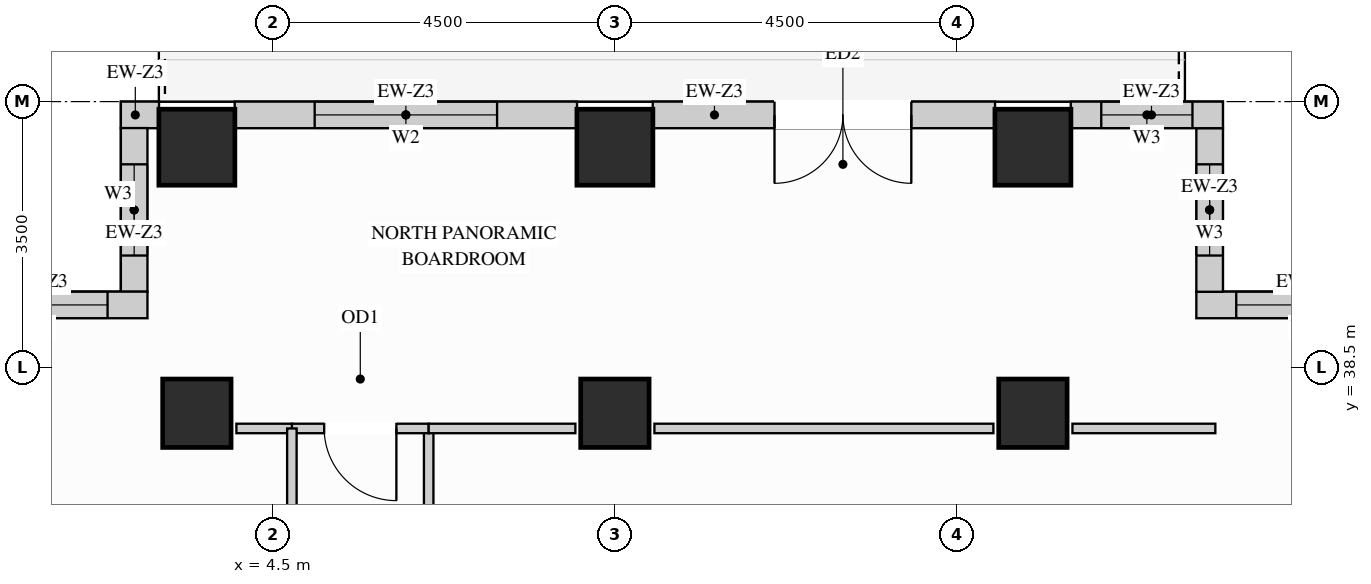
"""IFC4 building model, lengths in metres.
Left out: names, types, materials, properties, quantities, classifications, styles, units other than length and angle.
Written with IfcOpenShell. Run it as: python <this file> out.ifc"""

import sys

from ifc_helpers import new_model, si_unit, direction, frame, frame_2d, origin, origin_2d, place, context, subcontext, project, spatial, rectangle, extrude, source, transform, mapped, element, fill, save


model = new_model("IFC4")
c1 = context("Model", 3, precision=1e-05, world=origin(), true_north=direction((0.0, 1.0)))
c2 = subcontext(c1, "Body", "Model", "MODEL_VIEW")
j1 = project(units=[si_unit("LENGTHUNIT", "METRE"), si_unit("PLANEANGLEUNIT", "RADIAN")], contexts=[c1])
p1 = place(None, origin())
s1 = spatial("IfcSite", under=j1, at=p1, CompositionType="ELEMENT")
p2 = place(p1, origin())
s2 = spatial("IfcBuilding", under=s1, at=p2, CompositionType="ELEMENT")
p3 = place(p2, frame((0.0, 0.0, 143.1)))
s3 = spatial("IfcBuildingStorey", under=s2, at=p3, CompositionType="ELEMENT", Elevation=143.1)
m1 = source(origin(), c2, "Body", "SweptSolid", [
    extrude(rectangle(XDim=0.9, YDim=0.9, at=origin_2d()), origin(), (0.0, 0.0, 1.0), 3.4),
])
for number, where, z_axis, x_axis in (
    (1, (14.5, 37.9, 0.0), (0.0, 0.0, 1.0), (1.0, 0.0, 0.0)),
    (2, (3.5, 37.9, 0.0), (0.0, 0.0, 1.0), (1.0, 0.0, 0.0)),
    (3, (9.0, 37.9, 0.0), (0.0, 0.0, 1.0), (1.0, 0.0, 0.0)),
):
    element("IfcColumn", number, at=place(p3, frame(where, z_axis=z_axis, x_axis=x_axis)), inside=s3, PredefinedType="COLUMN", context=c2, shape_type="MappedRepresentation", body=[
        mapped(m1, transform((0.0, 0.0, 0.0), x_axis=(1.0, 0.0, 0.0), y_axis=(0.0, 1.0, 0.0), z_axis=(0.0, 0.0, 1.0))),
    ])
m2 = source(origin(), c2, "Body", "SweptSolid", [
    extrude(rectangle(XDim=1.0, YDim=1.0, at=origin_2d()), origin(), (0.0, 0.0, 1.0), 3.4),
])
for number, where, z_axis, x_axis in (
    (4, (14.5, 41.4, 0.0), (0.0, 0.0, 1.0), (1.0, 0.0, 0.0)),
    (5, (3.5, 41.4, 0.0), (0.0, 0.0, 1.0), (1.0, 0.0, 0.0)),
    (6, (9.0, 41.4, 0.0), (0.0, 0.0, 1.0), (1.0, 0.0, 0.0)),
):
    element("IfcColumn", number, at=place(p3, frame(where, z_axis=z_axis, x_axis=x_axis)), inside=s3, PredefinedType="COLUMN", context=c2, shape_type="MappedRepresentation", body=[
        mapped(m2, transform((0.0, 0.0, 0.0), x_axis=(1.0, 0.0, 0.0), y_axis=(0.0, 1.0, 0.0), z_axis=(0.0, 0.0, 1.0))),
    ])
p4 = place(p3, frame((19.5, 39.325, 0.0), z_axis=(0.0, 0.0, 1.0), x_axis=(-1.0, 0.0, 0.0)))
e7 = element("IfcWall", 7, at=p4, inside=s3, PredefinedType="SOLIDWALL", context=c2, shape_type="SweptSolid", body=[
    extrude(rectangle(XDim=2.85, YDim=0.35, at=frame_2d((1.425, 0.0))), origin(), (0.0, 0.0, 1.0), 3.385),
])
p5 = place(p4, frame((0.525, 0.0, 0.78)))
e8 = element("IfcOpeningElement", 8, at=p5, cuts=e7, PredefinedType="OPENING", context=c2, shape_type="SweptSolid", body=[
    extrude(rectangle(XDim=1.8, YDim=2.1, at=frame_2d((0.9, 1.05))), frame((0.0, 0.185, 0.0), z_axis=(0.0, -1.0, 0.0), x_axis=(1.0, 0.0, 0.0)), (0.0, 0.0, 1.0), 0.37),
])
p6 = place(p3, frame((16.825, 39.498, 0.0), z_axis=(0.0, 0.0, 1.0), x_axis=(0.0, 1.0, 0.0)))
e9 = element("IfcWall", 9, at=p6, inside=s3, PredefinedType="SOLIDWALL", context=c2, shape_type="SweptSolid", body=[
    extrude(rectangle(XDim=2.154, YDim=0.35, at=frame_2d((1.077, 0.0))), origin(), (0.0, 0.0, 1.0), 3.385),
])
p7 = place(p6, frame((0.477, 0.0, 0.78)))
e10 = element("IfcOpeningElement", 10, at=p7, cuts=e9, PredefinedType="OPENING", context=c2, shape_type="SweptSolid", body=[
    extrude(rectangle(XDim=1.2, YDim=2.1, at=frame_2d((0.6, 1.05))), frame((0.0, 0.185, 0.0), z_axis=(0.0, -1.0, 0.0), x_axis=(1.0, 0.0, 0.0)), (0.0, 0.0, 1.0), 0.37),
])
p8 = place(p3, frame((17.0, 41.825, 0.0), z_axis=(0.0, 0.0, 1.0), x_axis=(-1.0, 0.0, 0.0)))
e11 = element("IfcWall", 11, at=p8, inside=s3, PredefinedType="SOLIDWALL", context=c2, shape_type="SweptSolid", body=[
    extrude(rectangle(XDim=2.002, YDim=0.35, at=frame_2d((1.001, 0.0))), origin(), (0.0, 0.0, 1.0), 3.385),
])
p9 = place(p8, frame((0.401, 0.0, 0.78)))
e12 = element("IfcOpeningElement", 12, at=p9, cuts=e11, PredefinedType="OPENING", context=c2, shape_type="SweptSolid", body=[
    extrude(rectangle(XDim=1.2, YDim=2.1, at=frame_2d((0.6, 1.05))), frame((0.0, 0.185, 0.0), z_axis=(0.0, -1.0, 0.0), x_axis=(1.0, 0.0, 0.0)), (0.0, 0.0, 1.0), 0.37),
])
p10 = place(p3, frame((14.002, 41.825, 0.0), z_axis=(0.0, 0.0, 1.0), x_axis=(-1.0, 0.0, 0.0)))
e13 = element("IfcWall", 13, at=p10, inside=s3, PredefinedType="SOLIDWALL", context=c2, shape_type="SweptSolid", body=[
    extrude(rectangle(XDim=4.504, YDim=0.35, at=frame_2d((2.252, 0.0))), origin(), (0.0, 0.0, 1.0), 2.612),
])
p11 = place(p10, frame((1.102, 0.0, 0.0)))
e14 = element("IfcOpeningElement", 14, at=p11, cuts=e13, PredefinedType="OPENING", context=c2, shape_type="SweptSolid", body=[
    extrude(rectangle(XDim=1.8, YDim=2.2, at=frame_2d((0.9, 1.1))), frame((0.0, 0.185, 0.0), z_axis=(0.0, -1.0, 0.0), x_axis=(1.0, 0.0, 0.0)), (0.0, 0.0, 1.0), 0.37),
])
p12 = place(p3, frame((8.502, 41.825, 0.0), z_axis=(0.0, 0.0, 1.0), x_axis=(-1.0, 0.0, 0.0)))
e15 = element("IfcWall", 15, at=p12, inside=s3, PredefinedType="SOLIDWALL", context=c2, shape_type="SweptSolid", body=[
    extrude(rectangle(XDim=4.504, YDim=0.35, at=frame_2d((2.252, 0.0))), origin(), (0.0, 0.0, 1.0), 2.612),
])
p13 = place(p12, frame((1.052, 0.0, 0.78)))
e16 = element("IfcOpeningElement", 16, at=p13, cuts=e15, PredefinedType="OPENING", context=c2, shape_type="SweptSolid", body=[
    extrude(rectangle(XDim=2.4, YDim=1.652, at=frame_2d((1.2, 0.826))), frame((0.0, 0.185, 0.0), z_axis=(0.0, -1.0, 0.0), x_axis=(1.0, 0.0, 0.0)), (0.0, 0.0, 1.0), 0.37),
])
m3 = source(origin(), c2, "Body", "SweptSolid", [
    extrude(rectangle(XDim=0.502, YDim=0.35, at=frame_2d((0.251, 0.0))), origin(), (0.0, 0.0, 1.0), 3.385),
])
p14 = place(p3, frame((3.002, 41.825, 0.0), z_axis=(0.0, 0.0, 1.0), x_axis=(-1.0, 0.0, 0.0)))
e17 = element("IfcWall", 17, at=p14, inside=s3, PredefinedType="SOLIDWALL", context=c2, shape_type="MappedRepresentation", body=[
    mapped(m3, transform((0.0, 0.0, 0.0), x_axis=(1.0, 0.0, 0.0), y_axis=(0.0, 1.0, 0.0), z_axis=(0.0, 0.0, 1.0))),
])
p15 = place(p3, frame((2.675, 41.652, 0.0), z_axis=(0.0, 0.0, 1.0), x_axis=(0.0, -1.0, 0.0)))
e18 = element("IfcWall", 18, at=p15, inside=s3, PredefinedType="SOLIDWALL", context=c2, shape_type="SweptSolid", body=[
    extrude(rectangle(XDim=2.154, YDim=0.35, at=frame_2d((1.077, 0.0))), origin(), (0.0, 0.0, 1.0), 3.385),
])
p16 = place(p15, frame((0.477, 0.0, 0.78)))
e19 = element("IfcOpeningElement", 19, at=p16, cuts=e18, PredefinedType="OPENING", context=c2, shape_type="SweptSolid", body=[
    extrude(rectangle(XDim=1.2, YDim=2.1, at=frame_2d((0.6, 1.05))), frame((0.0, 0.185, 0.0), z_axis=(0.0, -1.0, 0.0), x_axis=(1.0, 0.0, 0.0)), (0.0, 0.0, 1.0), 0.37),
])
p17 = place(p3, frame((2.85, 39.325, 0.0), z_axis=(0.0, 0.0, 1.0), x_axis=(-1.0, 0.0, 0.0)))
e20 = element("IfcWall", 20, at=p17, inside=s3, PredefinedType="SOLIDWALL", context=c2, shape_type="SweptSolid", body=[
    extrude(rectangle(XDim=2.85, YDim=0.35, at=frame_2d((1.425, 0.0))), origin(), (0.0, 0.0, 1.0), 3.385),
])
p18 = place(p17, frame((0.525, 0.0, 0.78)))
e21 = element("IfcOpeningElement", 21, at=p18, cuts=e20, PredefinedType="OPENING", context=c2, shape_type="SweptSolid", body=[
    extrude(rectangle(XDim=1.8, YDim=2.1, at=frame_2d((0.9, 1.05))), frame((0.0, 0.185, 0.0), z_axis=(0.0, -1.0, 0.0), x_axis=(1.0, 0.0, 0.0)), (0.0, 0.0, 1.0), 0.37),
])
p19 = place(p3, frame((6.55, 34.675, 0.0), z_axis=(0.0, 0.0, 1.0), x_axis=(0.0, 1.0, 0.0)))
e22 = element("IfcWall", 22, at=p19, inside=s3, PredefinedType="PARTITIONING", context=c2, shape_type="SweptSolid", body=[
    extrude(rectangle(XDim=3.025, YDim=0.125, at=frame_2d((1.512, 0.0))), origin(), (0.0, 0.0, 1.0), 3.385),
])
p20 = place(p19, frame((1.038, 0.0, 0.0)))
e23 = element("IfcOpeningElement", 23, at=p20, cuts=e22, PredefinedType="OPENING", context=c2, shape_type="SweptSolid", body=[
    extrude(rectangle(XDim=0.95, YDim=2.15, at=frame_2d((0.475, 1.075))), frame((0.0, 0.073, 0.0), z_axis=(0.0, -1.0, 0.0), x_axis=(1.0, 0.0, 0.0)), (0.0, 0.0, 1.0), 0.145),
])
p21 = place(p3, frame((4.75, 37.7, 0.0), z_axis=(0.0, 0.0, 1.0), x_axis=(1.0, 0.0, 0.0)))
e24 = element("IfcWall", 24, at=p21, inside=s3, PredefinedType="PARTITIONING", context=c2, shape_type="SweptSolid", body=[
    extrude(rectangle(XDim=1.8, YDim=0.125, at=frame_2d((0.9, 0.0))), origin(), (0.0, 0.0, 1.0), 2.773),
])
p22 = place(p21, frame((0.425, 0.0, 0.0)))
e25 = element("IfcOpeningElement", 25, at=p22, cuts=e24, PredefinedType="OPENING", context=c2, shape_type="SweptSolid", body=[
    extrude(rectangle(XDim=0.95, YDim=2.15, at=frame_2d((0.475, 1.075))), frame((0.0, 0.073, 0.0), z_axis=(0.0, -1.0, 0.0), x_axis=(1.0, 0.0, 0.0)), (0.0, 0.0, 1.0), 0.145),
])
m4 = source(origin(), c2, "Body", "SweptSolid", [
    extrude(rectangle(XDim=1.93, YDim=0.125, at=frame_2d((0.965, 0.0))), origin(), (0.0, 0.0, 1.0), 2.773),
])
p23 = place(p3, frame((6.55, 37.7, 0.0), z_axis=(0.0, 0.0, 1.0), x_axis=(1.0, 0.0, 0.0)))
e26 = element("IfcWall", 26, at=p23, inside=s3, PredefinedType="PARTITIONING", context=c2, shape_type="MappedRepresentation", body=[
    mapped(m4, transform((0.0, 0.0, 0.0), x_axis=(1.0, 0.0, 0.0), y_axis=(0.0, 1.0, 0.0), z_axis=(0.0, 0.0, 1.0))),
])
m5 = source(origin(), c2, "Body", "SweptSolid", [
    extrude(rectangle(XDim=4.46, YDim=0.125, at=frame_2d((2.23, 0.0))), origin(), (0.0, 0.0, 1.0), 2.773),
])
p24 = place(p3, frame((9.52, 37.7, 0.0), z_axis=(0.0, 0.0, 1.0), x_axis=(1.0, 0.0, 0.0)))
e27 = element("IfcWall", 27, at=p24, inside=s3, PredefinedType="PARTITIONING", context=c2, shape_type="MappedRepresentation", body=[
    mapped(m5, transform((0.0, 0.0, 0.0), x_axis=(1.0, 0.0, 0.0), y_axis=(0.0, 1.0, 0.0), z_axis=(0.0, 0.0, 1.0))),
])
m6 = source(origin(), c2, "Body", "SweptSolid", [
    extrude(rectangle(XDim=1.88, YDim=0.125, at=frame_2d((0.94, 0.0))), origin(), (0.0, 0.0, 1.0), 2.773),
])
p25 = place(p3, frame((15.02, 37.7, 0.0), z_axis=(0.0, 0.0, 1.0), x_axis=(1.0, 0.0, 0.0)))
e28 = element("IfcWall", 28, at=p25, inside=s3, PredefinedType="PARTITIONING", context=c2, shape_type="MappedRepresentation", body=[
    mapped(m6, transform((0.0, 0.0, 0.0), x_axis=(1.0, 0.0, 0.0), y_axis=(0.0, 1.0, 0.0), z_axis=(0.0, 0.0, 1.0))),
])
m7 = source(origin(), c2, "Body", "SweptSolid", [
    extrude(rectangle(XDim=0.73, YDim=0.125, at=frame_2d((0.365, 0.0))), origin(), (0.0, 0.0, 1.0), 2.773),
])
p26 = place(p3, frame((4.02, 37.7, 0.0), z_axis=(0.0, 0.0, 1.0), x_axis=(1.0, 0.0, 0.0)))
e29 = element("IfcWall", 29, at=p26, inside=s3, PredefinedType="PARTITIONING", context=c2, shape_type="MappedRepresentation", body=[
    mapped(m7, transform((0.0, 0.0, 0.0), x_axis=(1.0, 0.0, 0.0), y_axis=(0.0, 1.0, 0.0), z_axis=(0.0, 0.0, 1.0))),
])
p27 = place(p3, frame((4.75, 34.675, 0.0), z_axis=(0.0, 0.0, 1.0), x_axis=(0.0, 1.0, 0.0)))
e30 = element("IfcWall", 30, at=p27, inside=s3, PredefinedType="PARTITIONING", context=c2, shape_type="SweptSolid", body=[
    extrude(rectangle(XDim=3.025, YDim=0.125, at=frame_2d((1.512, 0.0))), origin(), (0.0, 0.0, 1.0), 3.385),
])
p28 = place(p27, frame((1.038, 0.0, 0.0)))
e31 = element("IfcOpeningElement", 31, at=p28, cuts=e30, PredefinedType="OPENING", context=c2, shape_type="SweptSolid", body=[
    extrude(rectangle(XDim=0.95, YDim=2.15, at=frame_2d((0.475, 1.075))), frame((0.0, 0.073, 0.0), z_axis=(0.0, -1.0, 0.0), x_axis=(1.0, 0.0, 0.0)), (0.0, 0.0, 1.0), 0.145),
])
m8 = source(origin(), c2, "Body", "SweptSolid", [
    extrude(rectangle(XDim=1.8, YDim=2.2, at=frame_2d((0.9, 1.1))), frame((0.0, 0.025, 0.0), z_axis=(0.0, -1.0, 0.0), x_axis=(1.0, 0.0, 0.0)), (0.0, 0.0, 1.0), 0.05),
])
p29 = place(p11, frame((1.8, 0.0, 0.0), z_axis=(0.0, 0.0, 1.0), x_axis=(-1.0, 0.0, 0.0)))
e32 = element("IfcDoor", 32, at=p29, inside=s3, OperationType="DOUBLE_DOOR_SINGLE_SWING", PredefinedType="DOOR", context=c2, shape_type="MappedRepresentation", body=[
    mapped(m8, transform((0.0, 0.0, 0.0), x_axis=(1.0, 0.0, 0.0), y_axis=(0.0, 1.0, 0.0), z_axis=(0.0, 0.0, 1.0))),
])
fill(e14, e32)
m9 = source(origin(), c2, "Body", "SweptSolid", [
    extrude(rectangle(XDim=0.95, YDim=2.15, at=frame_2d((0.475, 1.075))), frame((0.0, 0.025, 0.0), z_axis=(0.0, -1.0, 0.0), x_axis=(1.0, 0.0, 0.0)), (0.0, 0.0, 1.0), 0.05),
])
p30 = place(p22, origin())
e33 = element("IfcDoor", 33, at=p30, inside=s3, OperationType="SINGLE_SWING_RIGHT", PredefinedType="DOOR", context=c2, shape_type="MappedRepresentation", body=[
    mapped(m9, transform((0.0, 0.0, 0.0), x_axis=(1.0, 0.0, 0.0), y_axis=(0.0, 1.0, 0.0), z_axis=(0.0, 0.0, 1.0))),
])
fill(e25, e33)
m10 = source(origin(), c2, "Body", "SweptSolid", [
    extrude(rectangle(XDim=1.8, YDim=2.1, at=frame_2d((0.9, 1.05))), frame((0.0, 0.03, 0.0), z_axis=(0.0, -1.0, 0.0), x_axis=(1.0, 0.0, 0.0)), (0.0, 0.0, 1.0), 0.06),
])
p31 = place(p5, origin())
e34 = element("IfcWindow", 34, at=p31, inside=s3, PartitioningType="SINGLE_PANEL", PredefinedType="WINDOW", context=c2, shape_type="MappedRepresentation", body=[
    mapped(m10, transform((0.0, 0.0, 0.0), x_axis=(1.0, 0.0, 0.0), y_axis=(0.0, 1.0, 0.0), z_axis=(0.0, 0.0, 1.0))),
])
fill(e8, e34)
p32 = place(p18, origin())
e35 = element("IfcWindow", 35, at=p32, inside=s3, PartitioningType="SINGLE_PANEL", PredefinedType="WINDOW", context=c2, shape_type="MappedRepresentation", body=[
    mapped(m10, transform((0.0, 0.0, 0.0), x_axis=(1.0, 0.0, 0.0), y_axis=(0.0, 1.0, 0.0), z_axis=(0.0, 0.0, 1.0))),
])
fill(e21, e35)
m11 = source(origin(), c2, "Body", "SweptSolid", [
    extrude(rectangle(XDim=2.4, YDim=1.652, at=frame_2d((1.2, 0.826))), frame((0.0, 0.03, 0.0), z_axis=(0.0, -1.0, 0.0), x_axis=(1.0, 0.0, 0.0)), (0.0, 0.0, 1.0), 0.06),
])
p33 = place(p13, origin())
e36 = element("IfcWindow", 36, at=p33, inside=s3, PartitioningType="SINGLE_PANEL", PredefinedType="WINDOW", context=c2, shape_type="MappedRepresentation", body=[
    mapped(m11, transform((0.0, 0.0, 0.0), x_axis=(1.0, 0.0, 0.0), y_axis=(0.0, 1.0, 0.0), z_axis=(0.0, 0.0, 1.0))),
])
fill(e16, e36)
m12 = source(origin(), c2, "Body", "SweptSolid", [
    extrude(rectangle(XDim=1.2, YDim=2.1, at=frame_2d((0.6, 1.05))), frame((0.0, 0.03, 0.0), z_axis=(0.0, -1.0, 0.0), x_axis=(1.0, 0.0, 0.0)), (0.0, 0.0, 1.0), 0.06),
])
p34 = place(p7, origin())
e37 = element("IfcWindow", 37, at=p34, inside=s3, PartitioningType="SINGLE_PANEL", PredefinedType="WINDOW", context=c2, shape_type="MappedRepresentation", body=[
    mapped(m12, transform((0.0, 0.0, 0.0), x_axis=(1.0, 0.0, 0.0), y_axis=(0.0, 1.0, 0.0), z_axis=(0.0, 0.0, 1.0))),
])
fill(e10, e37)
p35 = place(p9, origin())
e38 = element("IfcWindow", 38, at=p35, inside=s3, PartitioningType="SINGLE_PANEL", PredefinedType="WINDOW", context=c2, shape_type="MappedRepresentation", body=[
    mapped(m12, transform((0.0, 0.0, 0.0), x_axis=(1.0, 0.0, 0.0), y_axis=(0.0, 1.0, 0.0), z_axis=(0.0, 0.0, 1.0))),
])
fill(e12, e38)
p36 = place(p16, origin())
e39 = element("IfcWindow", 39, at=p36, inside=s3, PartitioningType="SINGLE_PANEL", PredefinedType="WINDOW", context=c2, shape_type="MappedRepresentation", body=[
    mapped(m12, transform((0.0, 0.0, 0.0), x_axis=(1.0, 0.0, 0.0), y_axis=(0.0, 1.0, 0.0), z_axis=(0.0, 0.0, 1.0))),
])
fill(e19, e39)
save(model, sys.argv[1])
